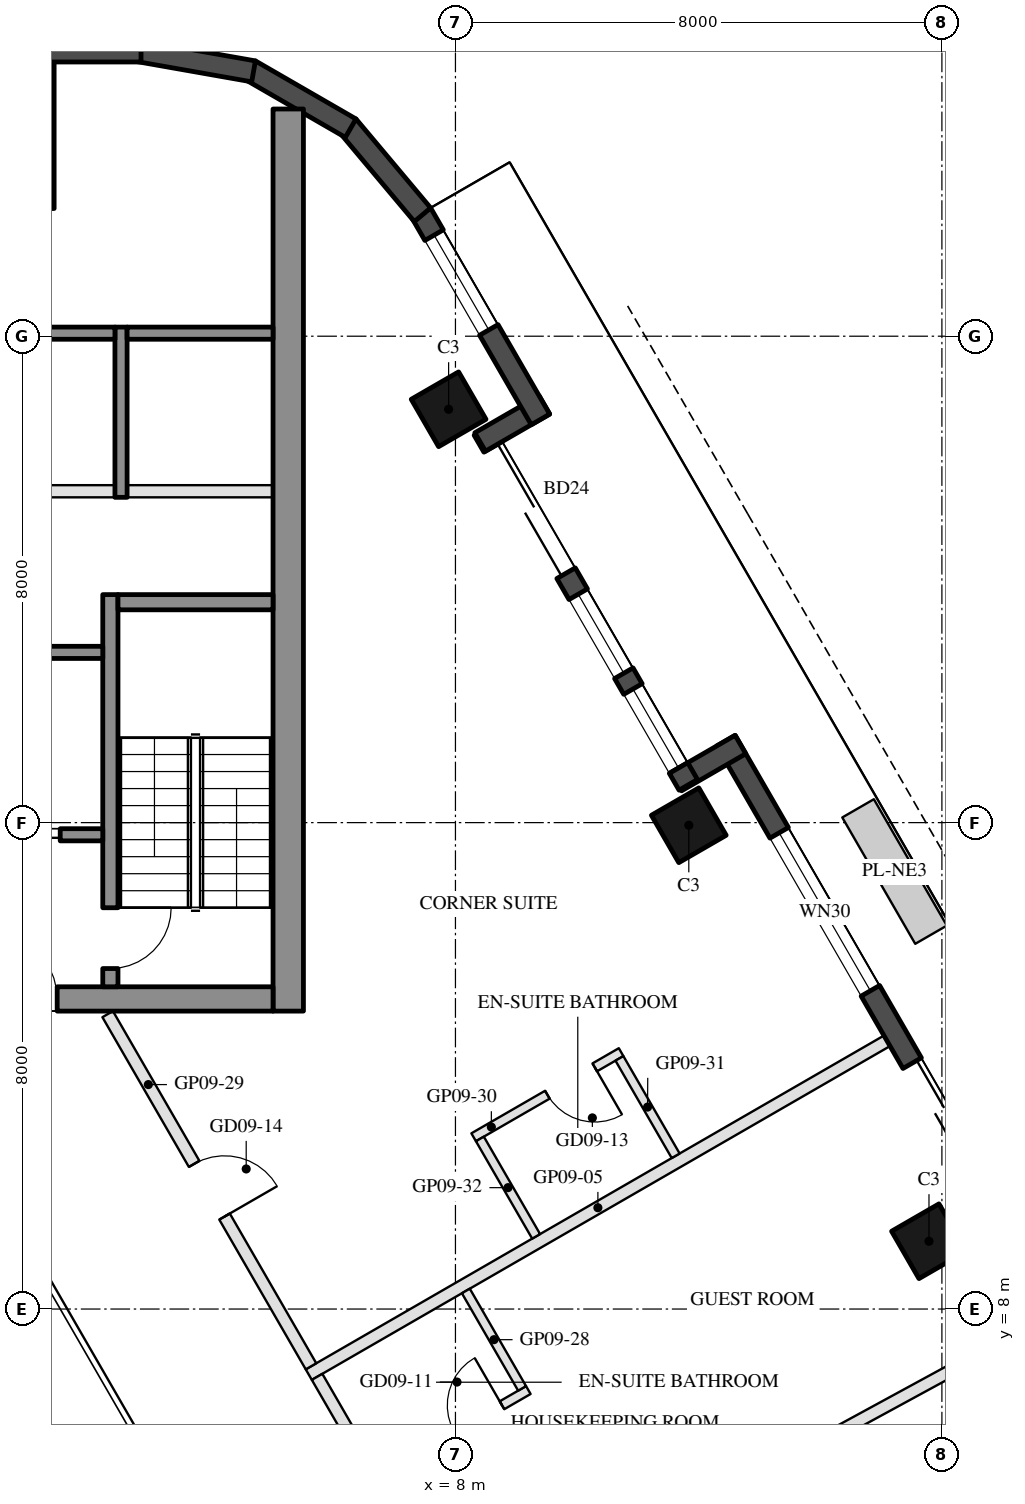
"""IFC4 building model, lengths in metres.
Left out: names, types, materials, properties, quantities, classifications, styles, units other than length and angle.
Written with IfcOpenShell. Run it as: python <this file> out.ifc"""

import sys

from ifc_helpers import new_model, si_unit, direction, frame, frame_2d, origin, origin_2d, place, context, subcontext, project, spatial, rectangle, hollow_rectangle, extrude, element, fill, save


model = new_model("IFC4")
c1 = context("Model", 3, precision=1e-05, world=origin(), true_north=direction((0.0, 1.0)))
c2 = subcontext(c1, "Body", "Model", "MODEL_VIEW")
j1 = project(units=[si_unit("LENGTHUNIT", "METRE"), si_unit("PLANEANGLEUNIT", "RADIAN")], contexts=[c1])
p1 = place(None, origin())
s1 = spatial("IfcSite", under=j1, at=p1, CompositionType="ELEMENT")
p2 = place(p1, origin())
s2 = spatial("IfcBuilding", under=s1, at=p2, CompositionType="ELEMENT")
p3 = place(p2, frame((0.0, 0.0, 113.1)))
s3 = spatial("IfcBuildingStorey", under=s2, at=p3, CompositionType="ELEMENT", Elevation=113.1)
for number, where, z_axis, x_axis in (
    (1, (15.788, 9.115, 0.0), (0.0, 0.0, 1.0), (-0.5, 0.866, 0.0)),
    (2, (11.838, 15.957, 0.0), (0.0, 0.0, 1.0), (-0.5, 0.866, 0.0)),
    (3, (7.888, 22.798, 0.0), (0.0, 0.0, 1.0), (-0.5, 0.866, 0.0)),
):
    element("IfcColumn", number, at=place(p3, frame(where, z_axis=z_axis, x_axis=x_axis)), inside=s3, PredefinedType="COLUMN", context=c2, shape_type="SweptSolid", body=[
        extrude(hollow_rectangle(XDim=0.9, YDim=0.9, WallThickness=0.04, at=origin_2d()), origin(), (0.0, 0.0, 1.0), 3.7),
    ])
p4 = place(p3, frame((0.0, 27.3, 0.0), z_axis=(0.0, 0.0, 1.0), x_axis=(1.0, 0.0, 0.0)))
e4 = element("IfcColumn", 4, at=p4, inside=s3, PredefinedType="COLUMN", context=c2, shape_type="SweptSolid", body=[
    extrude(hollow_rectangle(XDim=2.8, YDim=2.4, WallThickness=0.07, at=origin_2d()), origin(), (0.0, 0.0, 1.0), 3.7),
])
p5 = place(p3, frame((17.299, 8.948, 0.0), z_axis=(0.0, 0.0, 1.0), x_axis=(-0.500010041276, 0.866019606374, 0.0)))
e5 = element("IfcWall", 5, at=p5, inside=s3, PredefinedType="SOLIDWALL", context=c2, shape_type="SweptSolid", body=[
    extrude(rectangle(XDim=9.7, YDim=0.35, at=frame_2d((4.85, 0.0))), origin(), (0.0, 0.0, 1.0), 3.55),
])
p6 = place(p5, frame((1.775, 0.0, 0.0)))
e6 = element("IfcOpeningElement", 6, at=p6, cuts=e5, PredefinedType="OPENING", context=c2, shape_type="SweptSolid", body=[
    extrude(rectangle(XDim=1.8, YDim=2.4, at=frame_2d((0.9, 1.2))), frame((0.0, 0.185, 0.0), z_axis=(0.0, -1.0, 0.0), x_axis=(1.0, 0.0, 0.0)), (0.0, 0.0, 1.0), 0.37),
])
p7 = place(p5, frame((4.949, 0.0, 0.3)))
e7 = element("IfcOpeningElement", 7, at=p7, cuts=e5, PredefinedType="OPENING", context=c2, shape_type="SweptSolid", body=[
    extrude(rectangle(XDim=3.0, YDim=2.65, at=frame_2d((1.5, 1.325))), frame((0.0, 0.185, 0.0), z_axis=(0.0, -1.0, 0.0), x_axis=(1.0, 0.0, 0.0)), (0.0, 0.0, 1.0), 0.37),
])
p8 = place(p3, frame((12.688, 17.284, 0.0), z_axis=(0.0, 0.0, 1.0), x_axis=(-0.865955602162, -0.500120880472, 0.0)))
e8 = element("IfcWall", 8, at=p8, inside=s3, PredefinedType="SOLIDWALL", context=c2, shape_type="SweptSolid", body=[
    extrude(rectangle(XDim=1.22, YDim=0.35, at=frame_2d((0.61, 0.0))), origin(), (0.0, 0.0, 1.0), 3.55),
])
p9 = place(p3, frame((11.829, 16.621, 0.0), z_axis=(0.0, 0.0, 1.0), x_axis=(-0.500003597184, 0.866023326939, 0.0)))
e9 = element("IfcWall", 9, at=p9, inside=s3, PredefinedType="SOLIDWALL", context=c2, shape_type="SweptSolid", body=[
    extrude(rectangle(XDim=6.74, YDim=0.35, at=frame_2d((3.37, 0.0))), origin(), (0.0, 0.0, 1.0), 3.55),
])
p10 = place(p9, frame((4.02, 0.0, 0.0)))
e10 = element("IfcOpeningElement", 10, at=p10, cuts=e9, PredefinedType="OPENING", context=c2, shape_type="SweptSolid", body=[
    extrude(rectangle(XDim=2.4, YDim=2.4, at=frame_2d((1.2, 1.2))), frame((0.0, 0.185, 0.0), z_axis=(0.0, -1.0, 0.0), x_axis=(1.0, 0.0, 0.0)), (0.0, 0.0, 1.0), 0.37),
])
p11 = place(p9, frame((0.32, 0.0, 0.3)))
e11 = element("IfcOpeningElement", 11, at=p11, cuts=e9, PredefinedType="OPENING", context=c2, shape_type="SweptSolid", body=[
    extrude(rectangle(XDim=1.5, YDim=2.65, at=frame_2d((0.75, 1.325))), frame((0.0, 0.185, 0.0), z_axis=(0.0, -1.0, 0.0), x_axis=(1.0, 0.0, 0.0)), (0.0, 0.0, 1.0), 0.37),
])
p12 = place(p9, frame((2.12, 0.0, 0.3)))
e12 = element("IfcOpeningElement", 12, at=p12, cuts=e9, PredefinedType="OPENING", context=c2, shape_type="SweptSolid", body=[
    extrude(rectangle(XDim=1.5, YDim=2.65, at=frame_2d((0.75, 1.325))), frame((0.0, 0.185, 0.0), z_axis=(0.0, -1.0, 0.0), x_axis=(1.0, 0.0, 0.0)), (0.0, 0.0, 1.0), 0.37),
])
p13 = place(p3, frame((8.406, 22.26, 0.0), z_axis=(0.0, 0.0, 1.0), x_axis=(0.865955602162, 0.500120880472, 0.0)))
e13 = element("IfcWall", 13, at=p13, inside=s3, PredefinedType="SOLIDWALL", context=c2, shape_type="SweptSolid", body=[
    extrude(rectangle(XDim=1.22, YDim=0.35, at=frame_2d((0.61, 0.0))), origin(), (0.0, 0.0, 1.0), 3.55),
])
p14 = place(p3, frame((9.398, 22.631, 0.0), z_axis=(0.0, 0.0, 1.0), x_axis=(-0.499954521343, 0.866051659307, 0.0)))
e14 = element("IfcWall", 14, at=p14, inside=s3, PredefinedType="SOLIDWALL", context=c2, shape_type="SweptSolid", body=[
    extrude(rectangle(XDim=3.916, YDim=0.35, at=frame_2d((1.958, 0.0))), origin(), (0.0, 0.0, 1.0), 3.55),
])
p15 = place(p14, frame((1.7, 0.0, 0.3)))
e15 = element("IfcOpeningElement", 15, at=p15, cuts=e14, PredefinedType="OPENING", context=c2, shape_type="SweptSolid", body=[
    extrude(rectangle(XDim=1.8, YDim=2.65, at=frame_2d((0.9, 1.325))), frame((0.0, 0.185, 0.0), z_axis=(0.0, -1.0, 0.0), x_axis=(1.0, 0.0, 0.0)), (0.0, 0.0, 1.0), 0.37),
])
p16 = place(p3, frame((7.458, 25.998, 0.0), z_axis=(0.0, 0.0, 1.0), x_axis=(-0.642808304945, 0.766027077259, 0.0)))
e16 = element("IfcWall", 16, at=p16, inside=s3, PredefinedType="SOLIDWALL", context=c2, shape_type="SweptSolid", body=[
    extrude(rectangle(XDim=1.91, YDim=0.35, at=frame_2d((0.955, 0.0))), origin(), (0.0, 0.0, 1.0), 3.55),
])
for number, where, z_axis, x_axis in (
    (17, (6.277, 27.422, 0.0), (0.0, 0.0, 1.0), (-0.866, 0.5, 0.0)),
    (18, (4.68, 28.356, 0.0), (0.0, 0.0, 1.0), (-0.985, 0.174, 0.0)),
):
    element("IfcWall", number, at=place(p3, frame(where, z_axis=z_axis, x_axis=x_axis)), inside=s3, PredefinedType="SOLIDWALL", context=c2, shape_type="SweptSolid", body=[
        extrude(rectangle(XDim=1.91, YDim=0.35, at=frame_2d((0.955, 0.0))), origin(), (0.0, 0.0, 1.0), 3.55),
    ])
p17 = place(p3, frame((2.829, 28.685, 0.0), z_axis=(0.0, 0.0, 1.0), x_axis=(-1.0, 0.0, 0.0)))
e19 = element("IfcWall", 19, at=p17, inside=s3, PredefinedType="SOLIDWALL", context=c2, shape_type="SweptSolid", body=[
    extrude(rectangle(XDim=5.658, YDim=0.35, at=frame_2d((2.829, 0.0))), origin(), (0.0, 0.0, 1.0), 3.55),
])
p18 = place(p3, frame((5.25, 12.9, 0.0), z_axis=(0.0, 0.0, 1.0), x_axis=(0.0, 1.0, 0.0)))
e20 = element("IfcWall", 20, at=p18, inside=s3, PredefinedType="SHEAR", context=c2, shape_type="SweptSolid", body=[
    extrude(rectangle(XDim=14.837, YDim=0.5, at=frame_2d((7.418, 0.0))), origin(), (0.0, 0.0, 1.0), 3.5),
])
p19 = place(p3, frame((5.0, 13.1, 0.0), z_axis=(0.0, 0.0, 1.0), x_axis=(-1.0, 0.0, 0.0)))
e21 = element("IfcWall", 21, at=p19, inside=s3, PredefinedType="SHEAR", context=c2, shape_type="SweptSolid", body=[
    extrude(rectangle(XDim=10.0, YDim=0.4, at=frame_2d((5.0, 0.0))), origin(), (0.0, 0.0, 1.0), 3.5),
])
p20 = place(p19, frame((3.55, 0.0, 0.0)))
e22 = element("IfcOpeningElement", 22, at=p20, cuts=e21, PredefinedType="OPENING", context=c2, shape_type="SweptSolid", body=[
    extrude(rectangle(XDim=1.1, YDim=2.1, at=frame_2d((0.55, 1.05))), frame((0.0, 0.21, 0.0), z_axis=(0.0, -1.0, 0.0), x_axis=(1.0, 0.0, 0.0)), (0.0, 0.0, 1.0), 0.42),
])
p21 = place(p19, frame((5.85, 0.0, 0.0)))
e23 = element("IfcOpeningElement", 23, at=p21, cuts=e21, PredefinedType="OPENING", context=c2, shape_type="SweptSolid", body=[
    extrude(rectangle(XDim=1.4, YDim=2.1, at=frame_2d((0.7, 1.05))), frame((0.0, 0.21, 0.0), z_axis=(0.0, -1.0, 0.0), x_axis=(1.0, 0.0, 0.0)), (0.0, 0.0, 1.0), 0.42),
])
p22 = place(p3, frame((2.325, 13.3, 0.0), z_axis=(0.0, 0.0, 1.0), x_axis=(0.0, 1.0, 0.0)))
e24 = element("IfcWall", 24, at=p22, inside=s3, PredefinedType="SHEAR", context=c2, shape_type="SweptSolid", body=[
    extrude(rectangle(XDim=6.45, YDim=0.25, at=frame_2d((3.225, 0.0))), origin(), (0.0, 0.0, 1.0), 3.5),
])
p23 = place(p22, frame((0.3, 0.0, 0.0)))
e25 = element("IfcOpeningElement", 25, at=p23, cuts=e24, PredefinedType="OPENING", context=c2, shape_type="SweptSolid", body=[
    extrude(rectangle(XDim=1.0, YDim=2.1, at=frame_2d((0.5, 1.05))), frame((0.0, 0.135, 0.0), z_axis=(0.0, -1.0, 0.0), x_axis=(1.0, 0.0, 0.0)), (0.0, 0.0, 1.0), 0.27),
])
p24 = place(p3, frame((5.0, 19.625, 0.0), z_axis=(0.0, 0.0, 1.0), x_axis=(-1.0, 0.0, 0.0)))
e26 = element("IfcWall", 26, at=p24, inside=s3, PredefinedType="SHEAR", context=c2, shape_type="SweptSolid", body=[
    extrude(rectangle(XDim=2.55, YDim=0.25, at=frame_2d((1.275, 0.0))), origin(), (0.0, 0.0, 1.0), 3.5),
])
p25 = place(p3, frame((2.2, 18.8, 0.0), z_axis=(0.0, 0.0, 1.0), x_axis=(-1.0, 0.0, 0.0)))
e27 = element("IfcWall", 27, at=p25, inside=s3, PredefinedType="SHEAR", context=c2, shape_type="SweptSolid", body=[
    extrude(rectangle(XDim=2.8, YDim=0.2, at=frame_2d((1.4, 0.0))), origin(), (0.0, 0.0, 1.0), 3.5),
])
p26 = place(p3, frame((2.2, 15.8, 0.0), z_axis=(0.0, 0.0, 1.0), x_axis=(-1.0, 0.0, 0.0)))
e28 = element("IfcWall", 28, at=p26, inside=s3, PredefinedType="SHEAR", context=c2, shape_type="SweptSolid", body=[
    extrude(rectangle(XDim=2.8, YDim=0.2, at=frame_2d((1.4, 0.0))), origin(), (0.0, 0.0, 1.0), 3.5),
])
p27 = place(p26, frame((0.7, 0.0, 0.0)))
e29 = element("IfcOpeningElement", 29, at=p27, cuts=e28, PredefinedType="OPENING", context=c2, shape_type="SweptSolid", body=[
    extrude(rectangle(XDim=1.2, YDim=2.1, at=frame_2d((0.6, 1.05))), frame((0.0, 0.11, 0.0), z_axis=(0.0, -1.0, 0.0), x_axis=(1.0, 0.0, 0.0)), (0.0, 0.0, 1.0), 0.22),
])
p28 = place(p3, frame((2.5, 21.35, 0.0), z_axis=(0.0, 0.0, 1.0), x_axis=(0.0, 1.0, 0.0)))
e30 = element("IfcWall", 30, at=p28, inside=s3, PredefinedType="SHEAR", context=c2, shape_type="SweptSolid", body=[
    extrude(rectangle(XDim=2.8, YDim=0.2, at=frame_2d((1.4, 0.0))), origin(), (0.0, 0.0, 1.0), 3.5),
])
p29 = place(p3, frame((5.0, 24.05, 0.0), z_axis=(0.0, 0.0, 1.0), x_axis=(-1.0, 0.0, 0.0)))
e31 = element("IfcWall", 31, at=p29, inside=s3, PredefinedType="SHEAR", context=c2, shape_type="SweptSolid", body=[
    extrude(rectangle(XDim=2.4, YDim=0.2, at=frame_2d((1.2, 0.0))), origin(), (0.0, 0.0, 1.0), 3.5),
])
p30 = place(p3, frame((2.4, 24.05, 0.0), z_axis=(0.0, 0.0, 1.0), x_axis=(-1.0, 0.0, 0.0)))
e32 = element("IfcWall", 32, at=p30, inside=s3, PredefinedType="SHEAR", context=c2, shape_type="SweptSolid", body=[
    extrude(rectangle(XDim=2.8, YDim=0.2, at=frame_2d((1.4, 0.0))), origin(), (0.0, 0.0, 1.0), 3.5),
])
p31 = place(p3, frame((5.0, 21.45, 0.0), z_axis=(0.0, 0.0, 1.0), x_axis=(-1.0, 0.0, 0.0)))
e33 = element("IfcWall", 33, at=p31, inside=s3, PredefinedType="PARTITIONING", context=c2, shape_type="SweptSolid", body=[
    extrude(rectangle(XDim=2.4, YDim=0.2, at=frame_2d((1.2, 0.0))), origin(), (0.0, 0.0, 1.0), 3.5),
])
p32 = place(p3, frame((2.4, 21.45, 0.0), z_axis=(0.0, 0.0, 1.0), x_axis=(-1.0, 0.0, 0.0)))
e34 = element("IfcWall", 34, at=p32, inside=s3, PredefinedType="PARTITIONING", context=c2, shape_type="SweptSolid", body=[
    extrude(rectangle(XDim=2.8, YDim=0.2, at=frame_2d((1.4, 0.0))), origin(), (0.0, 0.0, 1.0), 3.5),
])
p33 = place(p3, frame((16.941, 7.417, 0.0), z_axis=(0.0, 0.0, 1.0), x_axis=(-0.878270052011, -0.478164946164, 0.0)))
e35 = element("IfcWall", 35, at=p33, inside=s3, PredefinedType="PARTITIONING", context=c2, shape_type="SweptSolid", body=[
    extrude(rectangle(XDim=10.083, YDim=0.2, at=frame_2d((5.042, 0.0))), origin(), (0.0, 0.0, 1.0), 2.96),
])
p34 = place(p3, frame((15.097, 12.411, 0.0), z_axis=(0.0, 0.0, 1.0), x_axis=(-0.866027479907, -0.499996404033, 0.0)))
e36 = element("IfcWall", 36, at=p34, inside=s3, PredefinedType="PARTITIONING", context=c2, shape_type="SweptSolid", body=[
    extrude(rectangle(XDim=10.98, YDim=0.2, at=frame_2d((5.49, 0.0))), origin(), (0.0, 0.0, 1.0), 2.96),
])
p35 = place(p3, frame((17.634, 6.217, 0.0), z_axis=(0.0, 0.0, 1.0), x_axis=(-0.844171272136, -0.536073561463, 0.0)))
e37 = element("IfcWall", 37, at=p35, inside=s3, PredefinedType="PARTITIONING", context=c2, shape_type="SweptSolid", body=[
    extrude(rectangle(XDim=10.089, YDim=0.15, at=frame_2d((5.044, 0.0))), origin(), (0.0, 0.0, 1.0), 2.95),
])
p36 = place(p3, frame((5.725, 6.885, 0.0), z_axis=(0.0, 0.0, 1.0), x_axis=(0.499986760557, -0.866033047446, 0.0)))
e38 = element("IfcWall", 38, at=p36, inside=s3, PredefinedType="PARTITIONING", context=c2, shape_type="SweptSolid", body=[
    extrude(rectangle(XDim=4.798, YDim=0.2, at=frame_2d((2.399, 0.0))), origin(), (0.0, 0.0, 1.0), 2.95),
])
p37 = place(p36, frame((2.45, 0.0, 0.0)))
e39 = element("IfcOpeningElement", 39, at=p37, cuts=e38, PredefinedType="OPENING", context=c2, shape_type="SweptSolid", body=[
    extrude(rectangle(XDim=1.0, YDim=2.1, at=frame_2d((0.5, 1.05))), frame((0.0, 0.11, 0.0), z_axis=(0.0, -1.0, 0.0), x_axis=(1.0, 0.0, 0.0)), (0.0, 0.0, 1.0), 0.22),
])
p38 = place(p3, frame((6.774, 5.268, 0.0), z_axis=(0.0, 0.0, 1.0), x_axis=(0.866034573852, 0.49998411664, 0.0)))
e40 = element("IfcWall", 40, at=p38, inside=s3, PredefinedType="PARTITIONING", context=c2, shape_type="SweptSolid", body=[
    extrude(rectangle(XDim=2.8, YDim=0.15, at=frame_2d((1.4, 0.0))), origin(), (0.0, 0.0, 1.0), 3.55),
])
p39 = place(p38, frame((1.4, 0.0, 0.0)))
e41 = element("IfcOpeningElement", 41, at=p39, cuts=e40, PredefinedType="OPENING", context=c2, shape_type="SweptSolid", body=[
    extrude(rectangle(XDim=0.9, YDim=2.1, at=frame_2d((0.45, 1.05))), frame((0.0, 0.085, 0.0), z_axis=(0.0, -1.0, 0.0), x_axis=(1.0, 0.0, 0.0)), (0.0, 0.0, 1.0), 0.17),
])
p40 = place(p3, frame((9.096, 6.695, 0.0), z_axis=(0.0, 0.0, 1.0), x_axis=(-0.500042316284, 0.866000971088, 0.0)))
e42 = element("IfcWall", 42, at=p40, inside=s3, PredefinedType="PARTITIONING", context=c2, shape_type="SweptSolid", body=[
    extrude(rectangle(XDim=1.85, YDim=0.15, at=frame_2d((0.925, 0.0))), origin(), (0.0, 0.0, 1.0), 3.55),
])
p41 = place(p3, frame((2.281, 12.85, 0.0), z_axis=(0.0, 0.0, 1.0), x_axis=(0.499982611572, -0.866035442765, 0.0)))
e43 = element("IfcWall", 43, at=p41, inside=s3, PredefinedType="PARTITIONING", context=c2, shape_type="SweptSolid", body=[
    extrude(rectangle(XDim=6.688, YDim=0.2, at=frame_2d((3.344, 0.0))), origin(), (0.0, 0.0, 1.0), 2.95),
])
p42 = place(p41, frame((2.844, 0.0, 0.0)))
e44 = element("IfcOpeningElement", 44, at=p42, cuts=e43, PredefinedType="OPENING", context=c2, shape_type="SweptSolid", body=[
    extrude(rectangle(XDim=1.0, YDim=2.1, at=frame_2d((0.5, 1.05))), frame((0.0, 0.11, 0.0), z_axis=(0.0, -1.0, 0.0), x_axis=(1.0, 0.0, 0.0)), (0.0, 0.0, 1.0), 0.22),
])
p43 = place(p3, frame((10.724, 12.225, 0.0), z_axis=(0.0, 0.0, 1.0), x_axis=(-0.866018616679, -0.500011755427, 0.0)))
e45 = element("IfcWall", 45, at=p43, inside=s3, PredefinedType="PARTITIONING", context=c2, shape_type="SweptSolid", body=[
    extrude(rectangle(XDim=2.8, YDim=0.15, at=frame_2d((1.4, 0.0))), origin(), (0.0, 0.0, 1.0), 3.55),
])
p44 = place(p43, frame((0.5, 0.0, 0.0)))
e46 = element("IfcOpeningElement", 46, at=p44, cuts=e45, PredefinedType="OPENING", context=c2, shape_type="SweptSolid", body=[
    extrude(rectangle(XDim=0.9, YDim=2.1, at=frame_2d((0.45, 1.05))), frame((0.0, 0.085, 0.0), z_axis=(0.0, -1.0, 0.0), x_axis=(1.0, 0.0, 0.0)), (0.0, 0.0, 1.0), 0.17),
])
p45 = place(p3, frame((11.622, 10.521, 0.0), z_axis=(0.0, 0.0, 1.0), x_axis=(-0.500042316284, 0.866000971088, 0.0)))
e47 = element("IfcWall", 47, at=p45, inside=s3, PredefinedType="PARTITIONING", context=c2, shape_type="SweptSolid", body=[
    extrude(rectangle(XDim=1.85, YDim=0.15, at=frame_2d((0.925, 0.0))), origin(), (0.0, 0.0, 1.0), 2.95),
])
p46 = place(p3, frame((9.327, 9.195, 0.0), z_axis=(0.0, 0.0, 1.0), x_axis=(-0.499985172903, 0.866033964044, 0.0)))
e48 = element("IfcWall", 48, at=p46, inside=s3, PredefinedType="PARTITIONING", context=c2, shape_type="SweptSolid", body=[
    extrude(rectangle(XDim=1.85, YDim=0.15, at=frame_2d((0.925, 0.0))), origin(), (0.0, 0.0, 1.0), 2.95),
])
p47 = place(p6, frame((1.8, 0.0, 0.0), z_axis=(0.0, 0.0, 1.0), x_axis=(-1.0, 0.0, 0.0)))
e49 = element("IfcDoor", 49, at=p47, inside=s3, OperationType="SLIDING_TO_LEFT", PredefinedType="DOOR", context=c2, shape_type="SweptSolid", body=[
    extrude(rectangle(XDim=1.8, YDim=2.4, at=frame_2d((0.9, 1.2))), frame((0.0, 0.025, 0.0), z_axis=(0.0, -1.0, 0.0), x_axis=(1.0, 0.0, 0.0)), (0.0, 0.0, 1.0), 0.05),
])
fill(e6, e49)
p48 = place(p7, origin())
e50 = element("IfcWindow", 50, at=p48, inside=s3, PartitioningType="SINGLE_PANEL", PredefinedType="WINDOW", context=c2, shape_type="SweptSolid", body=[
    extrude(rectangle(XDim=3.0, YDim=2.65, at=frame_2d((1.5, 1.325))), frame((0.0, 0.03, 0.0), z_axis=(0.0, -1.0, 0.0), x_axis=(1.0, 0.0, 0.0)), (0.0, 0.0, 1.0), 0.06),
])
fill(e7, e50)
p49 = place(p10, frame((2.4, 0.0, 0.0), z_axis=(0.0, 0.0, 1.0), x_axis=(-1.0, 0.0, 0.0)))
e51 = element("IfcDoor", 51, at=p49, inside=s3, OperationType="SLIDING_TO_LEFT", PredefinedType="DOOR", context=c2, shape_type="SweptSolid", body=[
    extrude(rectangle(XDim=2.4, YDim=2.4, at=frame_2d((1.2, 1.2))), frame((0.0, 0.025, 0.0), z_axis=(0.0, -1.0, 0.0), x_axis=(1.0, 0.0, 0.0)), (0.0, 0.0, 1.0), 0.05),
])
fill(e10, e51)
p50 = place(p11, origin())
e52 = element("IfcWindow", 52, at=p50, inside=s3, PartitioningType="SINGLE_PANEL", PredefinedType="WINDOW", context=c2, shape_type="SweptSolid", body=[
    extrude(rectangle(XDim=1.5, YDim=2.65, at=frame_2d((0.75, 1.325))), frame((0.0, 0.03, 0.0), z_axis=(0.0, -1.0, 0.0), x_axis=(1.0, 0.0, 0.0)), (0.0, 0.0, 1.0), 0.06),
])
fill(e11, e52)
p51 = place(p12, origin())
e53 = element("IfcWindow", 53, at=p51, inside=s3, PartitioningType="SINGLE_PANEL", PredefinedType="WINDOW", context=c2, shape_type="SweptSolid", body=[
    extrude(rectangle(XDim=1.5, YDim=2.65, at=frame_2d((0.75, 1.325))), frame((0.0, 0.03, 0.0), z_axis=(0.0, -1.0, 0.0), x_axis=(1.0, 0.0, 0.0)), (0.0, 0.0, 1.0), 0.06),
])
fill(e12, e53)
p52 = place(p15, origin())
e54 = element("IfcWindow", 54, at=p52, inside=s3, PartitioningType="SINGLE_PANEL", PredefinedType="WINDOW", context=c2, shape_type="SweptSolid", body=[
    extrude(rectangle(XDim=1.8, YDim=2.65, at=frame_2d((0.9, 1.325))), frame((0.0, 0.03, 0.0), z_axis=(0.0, -1.0, 0.0), x_axis=(1.0, 0.0, 0.0)), (0.0, 0.0, 1.0), 0.06),
])
fill(e15, e54)
p53 = place(p27, origin())
e55 = element("IfcDoor", 55, at=p53, inside=s3, OperationType="DOUBLE_DOOR_SLIDING", PredefinedType="DOOR", context=c2, shape_type="SweptSolid", body=[
    extrude(rectangle(XDim=1.2, YDim=2.1, at=frame_2d((0.6, 1.05))), frame((0.0, 0.025, 0.0), z_axis=(0.0, -1.0, 0.0), x_axis=(1.0, 0.0, 0.0)), (0.0, 0.0, 1.0), 0.05),
])
fill(e29, e55)
p54 = place(p20, frame((1.1, 0.0, 0.0), z_axis=(0.0, 0.0, 1.0), x_axis=(-1.0, 0.0, 0.0)))
e56 = element("IfcDoor", 56, at=p54, inside=s3, OperationType="SINGLE_SWING_LEFT", PredefinedType="DOOR", context=c2, shape_type="SweptSolid", body=[
    extrude(rectangle(XDim=1.1, YDim=2.1, at=frame_2d((0.55, 1.05))), frame((0.0, 0.025, 0.0), z_axis=(0.0, -1.0, 0.0), x_axis=(1.0, 0.0, 0.0)), (0.0, 0.0, 1.0), 0.05),
])
fill(e22, e56)
p55 = place(p23, frame((1.0, 0.0, 0.0), z_axis=(0.0, 0.0, 1.0), x_axis=(-1.0, 0.0, 0.0)))
e57 = element("IfcDoor", 57, at=p55, inside=s3, OperationType="SINGLE_SWING_LEFT", PredefinedType="DOOR", context=c2, shape_type="SweptSolid", body=[
    extrude(rectangle(XDim=1.0, YDim=2.1, at=frame_2d((0.5, 1.05))), frame((0.0, 0.025, 0.0), z_axis=(0.0, -1.0, 0.0), x_axis=(1.0, 0.0, 0.0)), (0.0, 0.0, 1.0), 0.05),
])
fill(e25, e57)
p56 = place(p39, origin())
e58 = element("IfcDoor", 58, at=p56, inside=s3, OperationType="SINGLE_SWING_RIGHT", PredefinedType="DOOR", context=c2, shape_type="SweptSolid", body=[
    extrude(rectangle(XDim=0.9, YDim=2.1, at=frame_2d((0.45, 1.05))), frame((0.0, 0.025, 0.0), z_axis=(0.0, -1.0, 0.0), x_axis=(1.0, 0.0, 0.0)), (0.0, 0.0, 1.0), 0.05),
])
fill(e41, e58)
p57 = place(p44, origin())
e59 = element("IfcDoor", 59, at=p57, inside=s3, OperationType="SINGLE_SWING_LEFT", PredefinedType="DOOR", context=c2, shape_type="SweptSolid", body=[
    extrude(rectangle(XDim=0.9, YDim=2.1, at=frame_2d((0.45, 1.05))), frame((0.0, 0.025, 0.0), z_axis=(0.0, -1.0, 0.0), x_axis=(1.0, 0.0, 0.0)), (0.0, 0.0, 1.0), 0.05),
])
fill(e46, e59)
p58 = place(p42, origin())
e60 = element("IfcDoor", 60, at=p58, inside=s3, OperationType="SINGLE_SWING_RIGHT", PredefinedType="DOOR", context=c2, shape_type="SweptSolid", body=[
    extrude(rectangle(XDim=1.0, YDim=2.1, at=frame_2d((0.5, 1.05))), frame((0.0, 0.025, 0.0), z_axis=(0.0, -1.0, 0.0), x_axis=(1.0, 0.0, 0.0)), (0.0, 0.0, 1.0), 0.05),
])
fill(e44, e60)
save(model, sys.argv[1])
